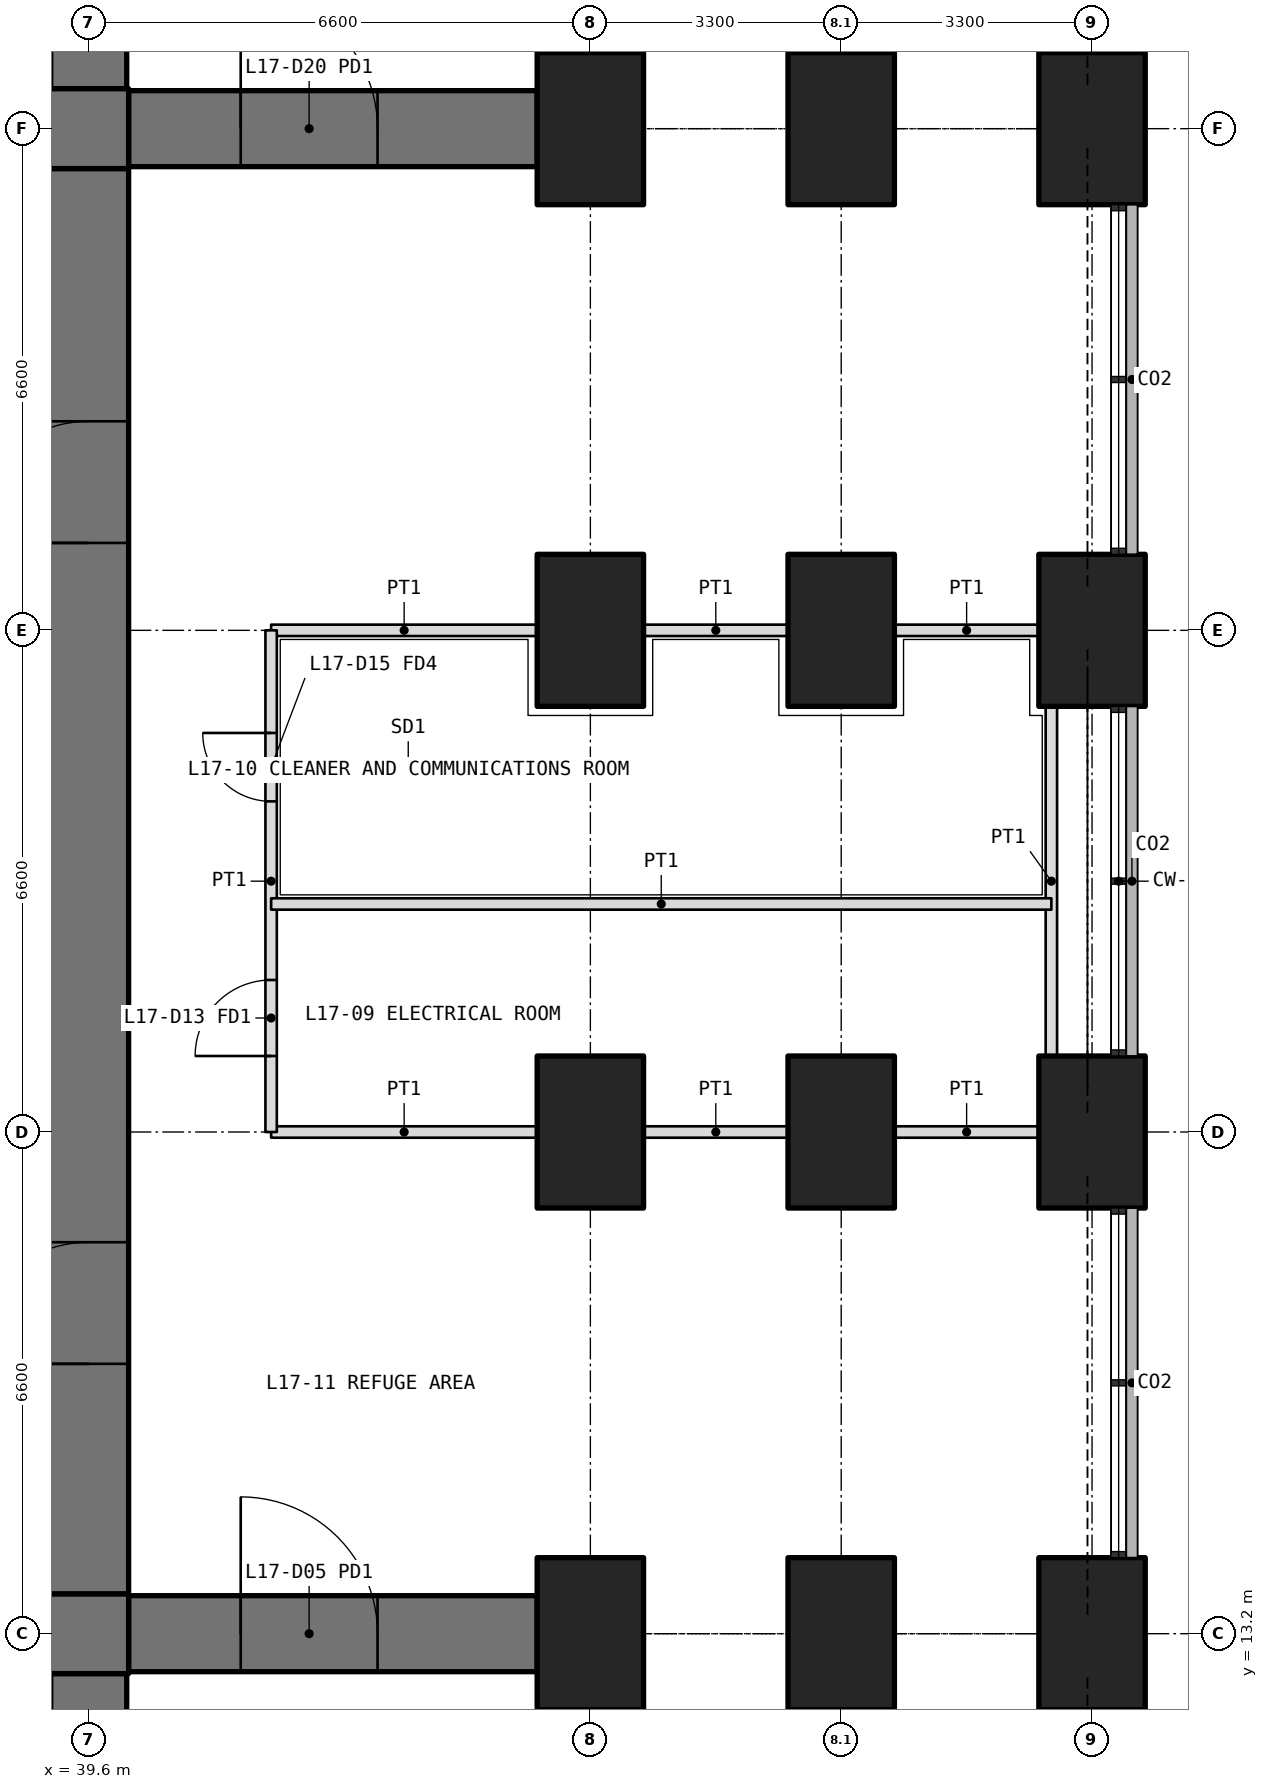
"""IFC4 building model, lengths in metres.
Left out: names, types, materials, properties, quantities, classifications, styles, units other than length and angle.
Written with IfcOpenShell. Run it as: python <this file> out.ifc"""

import sys

from ifc_helpers import new_model, si_unit, direction, frame, frame_2d, origin, origin_2d, place, context, subcontext, project, spatial, rectangle, extrude, element, fill, save


model = new_model("IFC4")
c1 = context("Model", 3, precision=1e-05, world=origin(), true_north=direction((0.0, 1.0)))
c2 = subcontext(c1, "Body", "Model", "MODEL_VIEW")
j1 = project(units=[si_unit("LENGTHUNIT", "METRE"), si_unit("PLANEANGLEUNIT", "RADIAN")], contexts=[c1])
p1 = place(None, origin())
s1 = spatial("IfcSite", under=j1, at=p1, CompositionType="ELEMENT")
p2 = place(p1, origin())
s2 = spatial("IfcBuilding", under=s1, at=p2, CompositionType="ELEMENT")
p3 = place(p2, frame((0.0, 0.0, 75.9)))
s3 = spatial("IfcBuildingStorey", under=s2, at=p3, CompositionType="ELEMENT", Elevation=75.9)
for number, where, z_axis, x_axis in (
    (1, (52.8, 13.2, 0.0), (0.0, 0.0, 1.0), (0.0, 1.0, 0.0)),
    (2, (52.8, 19.8, 0.0), (0.0, 0.0, 1.0), (0.0, 1.0, 0.0)),
    (3, (52.8, 26.4, 0.0), (0.0, 0.0, 1.0), (0.0, 1.0, 0.0)),
    (4, (52.8, 33.0, 0.0), (0.0, 0.0, 1.0), (0.0, 1.0, 0.0)),
    (5, (49.5, 13.2, 0.0), (0.0, 0.0, 1.0), (0.0, 1.0, 0.0)),
    (6, (49.5, 19.8, 0.0), (0.0, 0.0, 1.0), (0.0, 1.0, 0.0)),
    (7, (49.5, 26.4, 0.0), (0.0, 0.0, 1.0), (0.0, 1.0, 0.0)),
    (8, (49.5, 33.0, 0.0), (0.0, 0.0, 1.0), (0.0, 1.0, 0.0)),
    (9, (46.2, 13.2, 0.0), (0.0, 0.0, 1.0), (0.0, 1.0, 0.0)),
    (10, (46.2, 19.8, 0.0), (0.0, 0.0, 1.0), (0.0, 1.0, 0.0)),
    (11, (46.2, 26.4, 0.0), (0.0, 0.0, 1.0), (0.0, 1.0, 0.0)),
    (12, (46.2, 33.0, 0.0), (0.0, 0.0, 1.0), (0.0, 1.0, 0.0)),
):
    element("IfcColumn", number, at=place(p3, frame(where, z_axis=z_axis, x_axis=x_axis)), inside=s3, PredefinedType="COLUMN", context=c2, shape_type="SweptSolid", body=[
        extrude(rectangle(XDim=2.0, YDim=1.4, at=origin_2d()), origin(), (0.0, 0.0, 1.0), 6.3),
    ])
p4 = place(p3, frame((39.6, 12.675, 0.0), z_axis=(0.0, 0.0, 1.0), x_axis=(0.0, -1.0, 0.0)))
e13 = element("IfcWall", 13, at=p4, inside=s3, PredefinedType="SHEAR", context=c2, shape_type="SweptSolid", body=[
    extrude(rectangle(XDim=8.675, YDim=1.0, at=frame_2d((4.337, 0.0))), origin(), (0.0, 0.0, 1.0), 6.0),
])
p5 = place(p4, frame((1.475, 0.0, 0.0)))
e14 = element("IfcOpeningElement", 14, at=p5, cuts=e13, PredefinedType="OPENING", context=c2, shape_type="SweptSolid", body=[
    extrude(rectangle(XDim=1.8, YDim=2.4, at=frame_2d((0.9, 1.2))), frame((0.0, 0.51, 0.0), z_axis=(0.0, -1.0, 0.0), x_axis=(1.0, 0.0, 0.0)), (0.0, 0.0, 1.0), 1.02),
])
p6 = place(p3, frame((39.6, 33.525, 0.0), z_axis=(0.0, 0.0, 1.0), x_axis=(0.0, 1.0, 0.0)))
e15 = element("IfcWall", 15, at=p6, inside=s3, PredefinedType="SHEAR", context=c2, shape_type="SweptSolid", body=[
    extrude(rectangle(XDim=8.675, YDim=1.0, at=frame_2d((4.337, 0.0))), origin(), (0.0, 0.0, 1.0), 6.0),
])
p7 = place(p6, frame((1.475, 0.0, 0.0)))
e16 = element("IfcOpeningElement", 16, at=p7, cuts=e15, PredefinedType="OPENING", context=c2, shape_type="SweptSolid", body=[
    extrude(rectangle(XDim=1.8, YDim=2.4, at=frame_2d((0.9, 1.2))), frame((0.0, 0.51, 0.0), z_axis=(0.0, -1.0, 0.0), x_axis=(1.0, 0.0, 0.0)), (0.0, 0.0, 1.0), 1.02),
])
p8 = place(p3, frame((40.125, 13.2, 0.0), z_axis=(0.0, 0.0, 1.0), x_axis=(1.0, 0.0, 0.0)))
e17 = element("IfcWall", 17, at=p8, inside=s3, PredefinedType="SHEAR", context=c2, shape_type="SweptSolid", body=[
    extrude(rectangle(XDim=5.375, YDim=1.0, at=frame_2d((2.688, 0.0))), origin(), (0.0, 0.0, 1.0), 6.0),
])
p9 = place(p8, frame((1.475, 0.0, 0.0)))
e18 = element("IfcOpeningElement", 18, at=p9, cuts=e17, PredefinedType="OPENING", context=c2, shape_type="SweptSolid", body=[
    extrude(rectangle(XDim=1.8, YDim=2.4, at=frame_2d((0.9, 1.2))), frame((0.0, 0.51, 0.0), z_axis=(0.0, -1.0, 0.0), x_axis=(1.0, 0.0, 0.0)), (0.0, 0.0, 1.0), 1.02),
])
p10 = place(p3, frame((40.125, 33.0, 0.0), z_axis=(0.0, 0.0, 1.0), x_axis=(1.0, 0.0, 0.0)))
e19 = element("IfcWall", 19, at=p10, inside=s3, PredefinedType="SHEAR", context=c2, shape_type="SweptSolid", body=[
    extrude(rectangle(XDim=5.375, YDim=1.0, at=frame_2d((2.688, 0.0))), origin(), (0.0, 0.0, 1.0), 6.0),
])
p11 = place(p10, frame((1.475, 0.0, 0.0)))
e20 = element("IfcOpeningElement", 20, at=p11, cuts=e19, PredefinedType="OPENING", context=c2, shape_type="SweptSolid", body=[
    extrude(rectangle(XDim=1.8, YDim=2.4, at=frame_2d((0.9, 1.2))), frame((0.0, 0.51, 0.0), z_axis=(0.0, -1.0, 0.0), x_axis=(1.0, 0.0, 0.0)), (0.0, 0.0, 1.0), 1.02),
])
p12 = place(p3, frame((12.675, 13.2, 0.0), z_axis=(0.0, 0.0, 1.0), x_axis=(1.0, 0.0, 0.0)))
e21 = element("IfcWall", 21, at=p12, inside=s3, PredefinedType="SHEAR", context=c2, shape_type="SweptSolid", body=[
    extrude(rectangle(XDim=27.45, YDim=1.05, at=frame_2d((13.725, 0.0))), origin(), (0.0, 0.0, 1.0), 6.3),
])
p13 = place(p3, frame((39.6, 13.725, 0.0), z_axis=(0.0, 0.0, 1.0), x_axis=(0.0, 1.0, 0.0)))
e22 = element("IfcWall", 22, at=p13, inside=s3, PredefinedType="SHEAR", context=c2, shape_type="SweptSolid", body=[
    extrude(rectangle(XDim=18.75, YDim=1.05, at=frame_2d((9.375, 0.0))), origin(), (0.0, 0.0, 1.0), 6.3),
])
p14 = place(p13, frame((3.025, 0.0, 0.0)))
e23 = element("IfcOpeningElement", 23, at=p14, cuts=e22, PredefinedType="OPENING", context=c2, shape_type="SweptSolid", body=[
    extrude(rectangle(XDim=1.6, YDim=2.1, at=frame_2d((0.8, 1.05))), frame((0.0, 0.535, 0.0), z_axis=(0.0, -1.0, 0.0), x_axis=(1.0, 0.0, 0.0)), (0.0, 0.0, 1.0), 1.07),
])
p15 = place(p13, frame((13.825, 0.0, 0.0)))
e24 = element("IfcOpeningElement", 24, at=p15, cuts=e22, PredefinedType="OPENING", context=c2, shape_type="SweptSolid", body=[
    extrude(rectangle(XDim=1.6, YDim=2.1, at=frame_2d((0.8, 1.05))), frame((0.0, 0.535, 0.0), z_axis=(0.0, -1.0, 0.0), x_axis=(1.0, 0.0, 0.0)), (0.0, 0.0, 1.0), 1.07),
])
p16 = place(p3, frame((40.125, 33.0, 0.0), z_axis=(0.0, 0.0, 1.0), x_axis=(-1.0, 0.0, 0.0)))
e25 = element("IfcWall", 25, at=p16, inside=s3, PredefinedType="SHEAR", context=c2, shape_type="SweptSolid", body=[
    extrude(rectangle(XDim=27.45, YDim=1.05, at=frame_2d((13.725, 0.0))), origin(), (0.0, 0.0, 1.0), 6.3),
])
for number, where, z_axis, x_axis in (
    (26, (52.1, 19.8, 0.0), (0.0, 0.0, 1.0), (-1.0, 0.0, 0.0)),
    (27, (48.8, 19.8, 0.0), (0.0, 0.0, 1.0), (-1.0, 0.0, 0.0)),
):
    element("IfcWall", number, at=place(p3, frame(where, z_axis=z_axis, x_axis=x_axis)), inside=s3, PredefinedType="PARTITIONING", context=c2, shape_type="SweptSolid", body=[
        extrude(rectangle(XDim=1.9, YDim=0.15, at=frame_2d((0.95, 0.0))), origin(), (0.0, 0.0, 1.0), 4.0),
    ])
for number, where, z_axis, x_axis in (
    (28, (45.5, 19.8, 0.0), (0.0, 0.0, 1.0), (-1.0, 0.0, 0.0)),
    (29, (42.0, 26.4, 0.0), (0.0, 0.0, 1.0), (1.0, 0.0, 0.0)),
):
    element("IfcWall", number, at=place(p3, frame(where, z_axis=z_axis, x_axis=x_axis)), inside=s3, PredefinedType="PARTITIONING", context=c2, shape_type="SweptSolid", body=[
        extrude(rectangle(XDim=3.5, YDim=0.15, at=frame_2d((1.75, 0.0))), origin(), (0.0, 0.0, 1.0), 4.0),
    ])
for number, where, z_axis, x_axis in (
    (30, (46.9, 26.4, 0.0), (0.0, 0.0, 1.0), (1.0, 0.0, 0.0)),
    (31, (50.2, 26.4, 0.0), (0.0, 0.0, 1.0), (1.0, 0.0, 0.0)),
):
    element("IfcWall", number, at=place(p3, frame(where, z_axis=z_axis, x_axis=x_axis)), inside=s3, PredefinedType="PARTITIONING", context=c2, shape_type="SweptSolid", body=[
        extrude(rectangle(XDim=1.9, YDim=0.15, at=frame_2d((0.95, 0.0))), origin(), (0.0, 0.0, 1.0), 4.0),
    ])
p17 = place(p3, frame((42.0, 19.8, 0.0), z_axis=(0.0, 0.0, 1.0), x_axis=(0.0, 1.0, 0.0)))
e32 = element("IfcWall", 32, at=p17, inside=s3, PredefinedType="PARTITIONING", context=c2, shape_type="SweptSolid", body=[
    extrude(rectangle(XDim=6.6, YDim=0.15, at=frame_2d((3.3, 0.0))), origin(), (0.0, 0.0, 1.0), 4.0),
])
p18 = place(p17, frame((1.0, 0.0, 0.0)))
e33 = element("IfcOpeningElement", 33, at=p18, cuts=e32, PredefinedType="OPENING", context=c2, shape_type="SweptSolid", body=[
    extrude(rectangle(XDim=1.0, YDim=2.1, at=frame_2d((0.5, 1.05))), frame((0.0, 0.085, 0.0), z_axis=(0.0, -1.0, 0.0), x_axis=(1.0, 0.0, 0.0)), (0.0, 0.0, 1.0), 0.17),
])
p19 = place(p17, frame((4.35, 0.0, 0.0)))
e34 = element("IfcOpeningElement", 34, at=p19, cuts=e32, PredefinedType="OPENING", context=c2, shape_type="SweptSolid", body=[
    extrude(rectangle(XDim=0.9, YDim=2.1, at=frame_2d((0.45, 1.05))), frame((0.0, 0.085, 0.0), z_axis=(0.0, -1.0, 0.0), x_axis=(1.0, 0.0, 0.0)), (0.0, 0.0, 1.0), 0.17),
])
p20 = place(p3, frame((52.265, 25.4, 0.0), z_axis=(0.0, 0.0, 1.0), x_axis=(0.0, -1.0, 0.0)))
e35 = element("IfcWall", 35, at=p20, inside=s3, PredefinedType="PARTITIONING", context=c2, shape_type="SweptSolid", body=[
    extrude(rectangle(XDim=4.6, YDim=0.15, at=frame_2d((2.3, 0.0))), origin(), (0.0, 0.0, 1.0), 4.0),
])
p21 = place(p3, frame((42.0, 22.8, 0.0), z_axis=(0.0, 0.0, 1.0), x_axis=(1.0, 0.0, 0.0)))
e36 = element("IfcWall", 36, at=p21, inside=s3, PredefinedType="PARTITIONING", context=c2, shape_type="SweptSolid", body=[
    extrude(rectangle(XDim=10.265, YDim=0.15, at=frame_2d((5.132, 0.0))), origin(), (0.0, 0.0, 1.0), 4.0),
])
p22 = place(p18, origin())
e37 = element("IfcDoor", 37, at=p22, inside=s3, OperationType="SINGLE_SWING_LEFT", PredefinedType="DOOR", context=c2, shape_type="SweptSolid", body=[
    extrude(rectangle(XDim=1.0, YDim=2.1, at=frame_2d((0.5, 1.05))), frame((0.0, 0.025, 0.0), z_axis=(0.0, -1.0, 0.0), x_axis=(1.0, 0.0, 0.0)), (0.0, 0.0, 1.0), 0.05),
])
fill(e33, e37)
p23 = place(p19, origin())
e38 = element("IfcDoor", 38, at=p23, inside=s3, OperationType="SINGLE_SWING_RIGHT", PredefinedType="DOOR", context=c2, shape_type="SweptSolid", body=[
    extrude(rectangle(XDim=0.9, YDim=2.1, at=frame_2d((0.45, 1.05))), frame((0.0, 0.025, 0.0), z_axis=(0.0, -1.0, 0.0), x_axis=(1.0, 0.0, 0.0)), (0.0, 0.0, 1.0), 0.05),
])
fill(e34, e38)
p24 = place(p9, origin())
e39 = element("IfcDoor", 39, at=p24, inside=s3, OperationType="DOUBLE_DOOR_SINGLE_SWING", PredefinedType="DOOR", context=c2, shape_type="SweptSolid", body=[
    extrude(rectangle(XDim=1.8, YDim=2.4, at=frame_2d((0.9, 1.2))), frame((0.0, 0.025, 0.0), z_axis=(0.0, -1.0, 0.0), x_axis=(1.0, 0.0, 0.0)), (0.0, 0.0, 1.0), 0.05),
])
fill(e18, e39)
p25 = place(p11, origin())
e40 = element("IfcDoor", 40, at=p25, inside=s3, OperationType="DOUBLE_DOOR_SINGLE_SWING", PredefinedType="DOOR", context=c2, shape_type="SweptSolid", body=[
    extrude(rectangle(XDim=1.8, YDim=2.4, at=frame_2d((0.9, 1.2))), frame((0.0, 0.025, 0.0), z_axis=(0.0, -1.0, 0.0), x_axis=(1.0, 0.0, 0.0)), (0.0, 0.0, 1.0), 0.05),
])
fill(e20, e40)
p26 = place(p14, origin())
e41 = element("IfcDoor", 41, at=p26, inside=s3, OperationType="DOUBLE_DOOR_DOUBLE_SWING", PredefinedType="DOOR", context=c2, shape_type="SweptSolid", body=[
    extrude(rectangle(XDim=1.6, YDim=2.1, at=frame_2d((0.8, 1.05))), frame((0.0, 0.025, 0.0), z_axis=(0.0, -1.0, 0.0), x_axis=(1.0, 0.0, 0.0)), (0.0, 0.0, 1.0), 0.05),
])
fill(e23, e41)
p27 = place(p15, origin())
e42 = element("IfcDoor", 42, at=p27, inside=s3, OperationType="DOUBLE_DOOR_DOUBLE_SWING", PredefinedType="DOOR", context=c2, shape_type="SweptSolid", body=[
    extrude(rectangle(XDim=1.6, YDim=2.1, at=frame_2d((0.8, 1.05))), frame((0.0, 0.025, 0.0), z_axis=(0.0, -1.0, 0.0), x_axis=(1.0, 0.0, 0.0)), (0.0, 0.0, 1.0), 0.05),
])
fill(e24, e42)
save(model, sys.argv[1])
